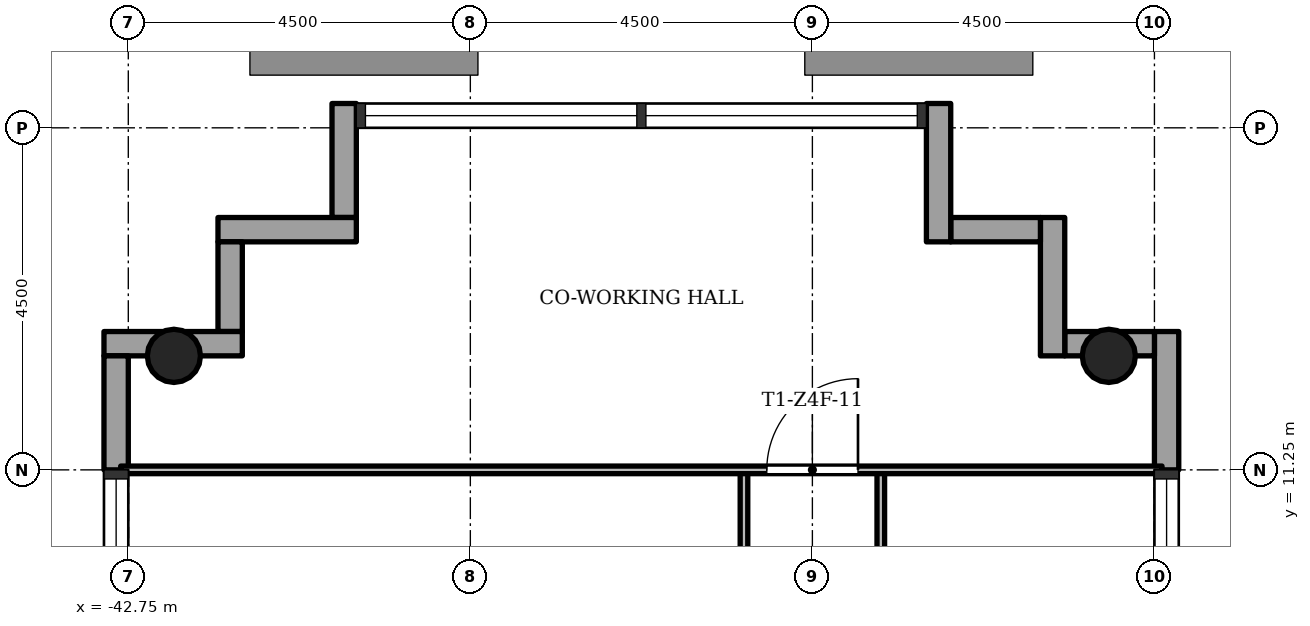
"""IFC4 building model, lengths in metres.
Left out: names, types, materials, properties, quantities, classifications, styles, units other than length and angle.
Written with IfcOpenShell. Run it as: python <this file> out.ifc"""

import sys

from ifc_helpers import new_model, si_unit, direction, frame, frame_2d, origin, origin_2d, place, context, subcontext, project, spatial, rectangle, hollow_circle, extrude, element, fill, save


model = new_model("IFC4")
c1 = context("Model", 3, precision=1e-05, world=origin(), true_north=direction((0.0, 1.0)))
c2 = subcontext(c1, "Body", "Model", "MODEL_VIEW")
j1 = project(units=[si_unit("LENGTHUNIT", "METRE"), si_unit("PLANEANGLEUNIT", "RADIAN")], contexts=[c1])
p1 = place(None, origin())
s1 = spatial("IfcSite", under=j1, at=p1, CompositionType="ELEMENT")
p2 = place(p1, origin())
s2 = spatial("IfcBuilding", under=s1, at=p2, CompositionType="ELEMENT")
p3 = place(p2, frame((0.0, 0.0, 216.4)))
s3 = spatial("IfcBuildingStorey", under=s2, at=p3, CompositionType="ELEMENT", Elevation=216.4)
for number, where, z_axis, x_axis in (
    (1, (-29.85, 12.75, 0.0), (0.0, 0.0, 1.0), (1.0, 0.0, 0.0)),
    (2, (-42.15, 12.75, 0.0), (0.0, 0.0, 1.0), (1.0, 0.0, 0.0)),
):
    element("IfcColumn", number, at=place(p3, frame(where, z_axis=z_axis, x_axis=x_axis)), inside=s3, PredefinedType="COLUMN", context=c2, shape_type="SweptSolid", body=[
        extrude(hollow_circle(Radius=0.35, WallThickness=0.025, at=origin_2d()), origin(), (0.0, 0.0, 1.0), 3.4),
    ])
p4 = place(p3, frame((-29.09, 11.25, -0.3), z_axis=(0.0, 0.0, 1.0), x_axis=(0.0, 1.0, 0.0)))
e3 = element("IfcWall", 3, at=p4, inside=s3, PredefinedType="STANDARD", context=c2, shape_type="SweptSolid", body=[
    extrude(rectangle(XDim=1.82, YDim=0.32, at=frame_2d((0.91, 0.0))), origin(), (0.0, 0.0, 1.0), 3.4),
])
p5 = place(p3, frame((-29.25, 12.91, -0.3), z_axis=(0.0, 0.0, 1.0), x_axis=(-1.0, 0.0, 0.0)))
e4 = element("IfcWall", 4, at=p5, inside=s3, PredefinedType="STANDARD", context=c2, shape_type="SweptSolid", body=[
    extrude(rectangle(XDim=1.18, YDim=0.32, at=frame_2d((0.59, 0.0))), origin(), (0.0, 0.0, 1.0), 3.4),
])
p6 = place(p3, frame((-30.59, 12.75, -0.3), z_axis=(0.0, 0.0, 1.0), x_axis=(0.0, 1.0, 0.0)))
e5 = element("IfcWall", 5, at=p6, inside=s3, PredefinedType="STANDARD", context=c2, shape_type="SweptSolid", body=[
    extrude(rectangle(XDim=1.82, YDim=0.32, at=frame_2d((0.91, 0.0))), origin(), (0.0, 0.0, 1.0), 3.4),
])
p7 = place(p3, frame((-30.75, 14.41, -0.3), z_axis=(0.0, 0.0, 1.0), x_axis=(-1.0, 0.0, 0.0)))
e6 = element("IfcWall", 6, at=p7, inside=s3, PredefinedType="STANDARD", context=c2, shape_type="SweptSolid", body=[
    extrude(rectangle(XDim=1.18, YDim=0.32, at=frame_2d((0.59, 0.0))), origin(), (0.0, 0.0, 1.0), 3.4),
])
p8 = place(p3, frame((-32.09, 14.25, -0.3), z_axis=(0.0, 0.0, 1.0), x_axis=(0.0, 1.0, 0.0)))
e7 = element("IfcWall", 7, at=p8, inside=s3, PredefinedType="STANDARD", context=c2, shape_type="SweptSolid", body=[
    extrude(rectangle(XDim=1.82, YDim=0.32, at=frame_2d((0.91, 0.0))), origin(), (0.0, 0.0, 1.0), 3.4),
])
p9 = place(p3, frame((-39.91, 16.07, -0.3), z_axis=(0.0, 0.0, 1.0), x_axis=(0.0, -1.0, 0.0)))
e8 = element("IfcWall", 8, at=p9, inside=s3, PredefinedType="STANDARD", context=c2, shape_type="SweptSolid", body=[
    extrude(rectangle(XDim=1.5, YDim=0.32, at=frame_2d((0.75, 0.0))), origin(), (0.0, 0.0, 1.0), 3.4),
])
p10 = place(p3, frame((-39.75, 14.41, -0.3), z_axis=(0.0, 0.0, 1.0), x_axis=(-1.0, 0.0, 0.0)))
e9 = element("IfcWall", 9, at=p10, inside=s3, PredefinedType="STANDARD", context=c2, shape_type="SweptSolid", body=[
    extrude(rectangle(XDim=1.82, YDim=0.32, at=frame_2d((0.91, 0.0))), origin(), (0.0, 0.0, 1.0), 3.4),
])
p11 = place(p3, frame((-41.41, 14.25, -0.3), z_axis=(0.0, 0.0, 1.0), x_axis=(0.0, -1.0, 0.0)))
e10 = element("IfcWall", 10, at=p11, inside=s3, PredefinedType="STANDARD", context=c2, shape_type="SweptSolid", body=[
    extrude(rectangle(XDim=1.18, YDim=0.32, at=frame_2d((0.59, 0.0))), origin(), (0.0, 0.0, 1.0), 3.4),
])
p12 = place(p3, frame((-41.25, 12.91, -0.3), z_axis=(0.0, 0.0, 1.0), x_axis=(-1.0, 0.0, 0.0)))
e11 = element("IfcWall", 11, at=p12, inside=s3, PredefinedType="STANDARD", context=c2, shape_type="SweptSolid", body=[
    extrude(rectangle(XDim=1.82, YDim=0.32, at=frame_2d((0.91, 0.0))), origin(), (0.0, 0.0, 1.0), 3.4),
])
p13 = place(p3, frame((-42.91, 12.75, -0.3), z_axis=(0.0, 0.0, 1.0), x_axis=(0.0, -1.0, 0.0)))
e12 = element("IfcWall", 12, at=p13, inside=s3, PredefinedType="STANDARD", context=c2, shape_type="SweptSolid", body=[
    extrude(rectangle(XDim=1.5, YDim=0.32, at=frame_2d((0.75, 0.0))), origin(), (0.0, 0.0, 1.0), 3.4),
])
p14 = place(p3, frame((-34.65, 8.55, 0.0), z_axis=(0.0, 0.0, 1.0), x_axis=(0.0, 1.0, 0.0)))
e13 = element("IfcWall", 13, at=p14, inside=s3, PredefinedType="PARTITIONING", context=c2, shape_type="SweptSolid", body=[
    extrude(rectangle(XDim=2.7, YDim=0.1, at=frame_2d((1.35, 0.0))), origin(), (0.0, 0.0, 1.0), 3.0),
])
p15 = place(p14, frame((0.07, 0.0, 0.0)))
e14 = element("IfcOpeningElement", 14, at=p15, cuts=e13, PredefinedType="OPENING", context=c2, shape_type="SweptSolid", body=[
    extrude(rectangle(XDim=0.9, YDim=2.1, at=frame_2d((0.45, 1.05))), frame((0.0, 0.06, 0.0), z_axis=(0.0, -1.0, 0.0), x_axis=(1.0, 0.0, 0.0)), (0.0, 0.0, 1.0), 0.12),
])
p16 = place(p3, frame((-32.85, 6.75, 0.0), z_axis=(0.0, 0.0, 1.0), x_axis=(0.0, 1.0, 0.0)))
e15 = element("IfcWall", 15, at=p16, inside=s3, PredefinedType="PARTITIONING", context=c2, shape_type="SweptSolid", body=[
    extrude(rectangle(XDim=4.5, YDim=0.1, at=frame_2d((2.25, 0.0))), origin(), (0.0, 0.0, 1.0), 3.0),
])
p17 = place(p16, frame((1.8, 0.0, 0.0)))
e16 = element("IfcOpeningElement", 16, at=p17, cuts=e15, PredefinedType="OPENING", context=c2, shape_type="SweptSolid", body=[
    extrude(rectangle(XDim=0.9, YDim=2.1, at=frame_2d((0.45, 1.05))), frame((0.0, 0.06, 0.0), z_axis=(0.0, -1.0, 0.0), x_axis=(1.0, 0.0, 0.0)), (0.0, 0.0, 1.0), 0.12),
])
p18 = place(p3, frame((-42.85, 11.25, 0.0), z_axis=(0.0, 0.0, 1.0), x_axis=(1.0, 0.0, 0.0)))
e17 = element("IfcWall", 17, at=p18, inside=s3, PredefinedType="PARTITIONING", context=c2, shape_type="SweptSolid", body=[
    extrude(rectangle(XDim=13.7, YDim=0.1, at=frame_2d((6.85, 0.0))), origin(), (0.0, 0.0, 1.0), 3.0),
])
p19 = place(p18, frame((8.5, 0.0, 0.0)))
e18 = element("IfcOpeningElement", 18, at=p19, cuts=e17, PredefinedType="OPENING", context=c2, shape_type="SweptSolid", body=[
    extrude(rectangle(XDim=1.2, YDim=2.1, at=frame_2d((0.6, 1.05))), frame((0.0, 0.06, 0.0), z_axis=(0.0, -1.0, 0.0), x_axis=(1.0, 0.0, 0.0)), (0.0, 0.0, 1.0), 0.12),
])
p20 = place(p19, origin())
e19 = element("IfcDoor", 19, at=p20, inside=s3, OperationType="SINGLE_SWING_LEFT", PredefinedType="DOOR", context=c2, shape_type="SweptSolid", body=[
    extrude(rectangle(XDim=1.2, YDim=2.1, at=frame_2d((0.6, 1.05))), frame((0.0, 0.025, 0.0), z_axis=(0.0, -1.0, 0.0), x_axis=(1.0, 0.0, 0.0)), (0.0, 0.0, 1.0), 0.05),
])
fill(e18, e19)
save(model, sys.argv[1])
